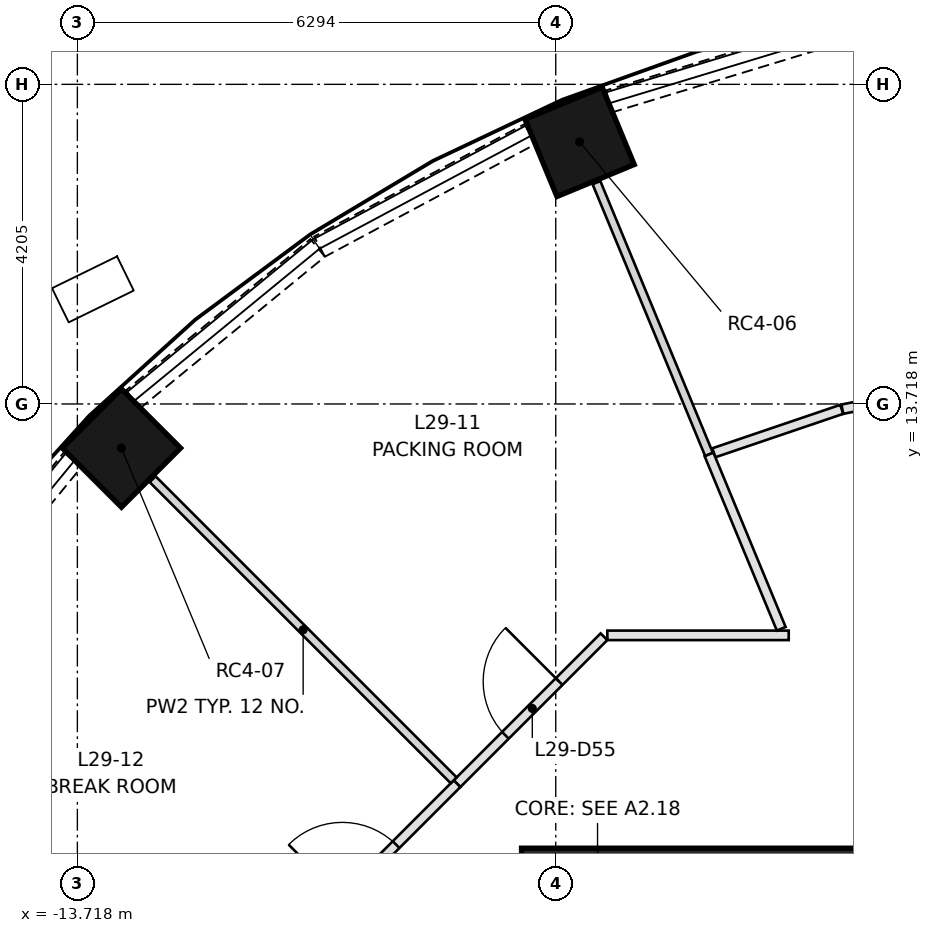
"""IFC4 building model, lengths in metres.
Left out: names, types, materials, properties, quantities, classifications, styles, units other than length and angle.
Written with IfcOpenShell. Run it as: python <this file> out.ifc"""

import sys

from ifc_helpers import new_model, si_unit, direction, frame, frame_2d, origin, origin_2d, place, context, subcontext, project, spatial, rectangle, extrude, element, fill, save


model = new_model("IFC4")
c1 = context("Model", 3, precision=1e-05, world=origin(), true_north=direction((0.0, 1.0)))
c2 = subcontext(c1, "Body", "Model", "MODEL_VIEW")
j1 = project(units=[si_unit("LENGTHUNIT", "METRE"), si_unit("PLANEANGLEUNIT", "RADIAN")], contexts=[c1])
p1 = place(None, origin())
s1 = spatial("IfcSite", under=j1, at=p1, CompositionType="ELEMENT")
p2 = place(p1, origin())
s2 = spatial("IfcBuilding", under=s1, at=p2, CompositionType="ELEMENT")
p3 = place(p2, frame((0.0, 0.0, 112.9)))
s3 = spatial("IfcBuildingStorey", under=s2, at=p3, CompositionType="ELEMENT", Elevation=112.9)
for number, where, z_axis, x_axis in (
    (1, (-7.11, 17.166, 0.0), (0.0, 0.0, 1.0), (-0.383, 0.924, 0.0)),
    (2, (-13.138, 13.138, 0.0), (0.0, 0.0, 1.0), (-0.707, 0.707, 0.0)),
):
    element("IfcColumn", number, at=place(p3, frame(where, z_axis=z_axis, x_axis=x_axis)), inside=s3, PredefinedType="COLUMN", context=c2, shape_type="SweptSolid", body=[
        extrude(rectangle(XDim=1.1, YDim=1.1, at=origin_2d()), origin(), (0.0, 0.0, 1.0), 3.65),
    ])
p4 = place(p3, frame((-7.874, 7.499, 0.0), z_axis=(0.0, 0.0, 1.0), x_axis=(1.0, 0.0, 0.0)))
e3 = element("IfcWall", 3, at=p4, inside=s3, PredefinedType="SHEAR", context=c2, shape_type="SweptSolid", body=[
    extrude(rectangle(XDim=15.748, YDim=0.75, at=frame_2d((7.874, 0.0))), origin(), (0.0, 0.0, 1.0), 3.65),
])
p5 = place(p3, frame((-3.717, 18.611, 0.0), z_axis=(0.0, 0.0, 1.0), x_axis=(-0.956961595403, -0.290214584271, 0.0)))
e4 = element("IfcWall", 4, at=p5, inside=s3, PredefinedType="SOLIDWALL", context=c2, shape_type="SweptSolid", body=[
    extrude(rectangle(XDim=3.139, YDim=0.3, at=frame_2d((1.57, 0.0))), origin(), (0.0, 0.0, 1.0), 0.9),
])
p6 = place(p3, frame((-7.763, 17.268, 0.0), z_axis=(0.0, 0.0, 1.0), x_axis=(-0.88193278355, -0.471375185282, 0.0)))
e5 = element("IfcWall", 5, at=p6, inside=s3, PredefinedType="SOLIDWALL", context=c2, shape_type="SweptSolid", body=[
    extrude(rectangle(XDim=3.139, YDim=0.3, at=frame_2d((1.57, 0.0))), origin(), (0.0, 0.0, 1.0), 0.9),
])
for number, where, z_axis, x_axis in (
    (6, (-10.557, 15.771, 0.0), (0.0, 0.0, 1.0), (-0.773, -0.634, 0.0)),
    (7, (-13.781, 12.983, 0.0), (0.0, 0.0, 1.0), (-0.634, -0.773, 0.0)),
):
    element("IfcWall", number, at=place(p3, frame(where, z_axis=z_axis, x_axis=x_axis)), inside=s3, PredefinedType="SOLIDWALL", context=c2, shape_type="SweptSolid", body=[
        extrude(rectangle(XDim=3.139, YDim=0.3, at=frame_2d((1.569, 0.0))), origin(), (0.0, 0.0, 1.0), 0.9),
    ])
p7 = place(p3, frame((-8.722, 8.722, 0.0), z_axis=(0.0, 0.0, 1.0), x_axis=(0.707062130741, 0.707151428813, 0.0)))
e8 = element("IfcWall", 8, at=p7, inside=s3, PredefinedType="PARTITIONING", context=c2, shape_type="SweptSolid", body=[
    extrude(rectangle(XDim=2.734, YDim=0.125, at=frame_2d((1.367, 0.0))), origin(), (0.0, 0.0, 1.0), 3.3),
])
p8 = place(p7, frame((0.9, 0.0, 0.0)))
e9 = element("IfcOpeningElement", 9, at=p8, cuts=e8, PredefinedType="OPENING", context=c2, shape_type="SweptSolid", body=[
    extrude(rectangle(XDim=1.0, YDim=2.1, at=frame_2d((0.5, 1.05))), frame((0.0, 0.073, 0.0), z_axis=(0.0, -1.0, 0.0), x_axis=(1.0, 0.0, 0.0)), (0.0, 0.0, 1.0), 0.145),
])
p9 = place(p3, frame((-6.745, 10.674, 0.0), z_axis=(0.0, 0.0, 1.0), x_axis=(1.0, 0.0, 0.0)))
e10 = element("IfcWall", 10, at=p9, inside=s3, PredefinedType="PARTITIONING", context=c2, shape_type="SweptSolid", body=[
    extrude(rectangle(XDim=2.386, YDim=0.125, at=frame_2d((1.193, 0.0))), origin(), (0.0, 0.0, 1.0), 3.3),
])
p10 = place(p3, frame((-10.656, 6.789, 0.0), z_axis=(0.0, 0.0, 1.0), x_axis=(0.707151428813, 0.707062130741, 0.0)))
e11 = element("IfcWall", 11, at=p10, inside=s3, PredefinedType="PARTITIONING", context=c2, shape_type="SweptSolid", body=[
    extrude(rectangle(XDim=2.734, YDim=0.125, at=frame_2d((1.367, 0.0))), origin(), (0.0, 0.0, 1.0), 3.3),
])
p11 = place(p10, frame((0.6, 0.0, 0.0)))
e12 = element("IfcOpeningElement", 12, at=p11, cuts=e11, PredefinedType="OPENING", context=c2, shape_type="SweptSolid", body=[
    extrude(rectangle(XDim=1.0, YDim=2.1, at=frame_2d((0.5, 1.05))), frame((0.0, 0.073, 0.0), z_axis=(0.0, -1.0, 0.0), x_axis=(1.0, 0.0, 0.0)), (0.0, 0.0, 1.0), 0.145),
])
p12 = place(p3, frame((-3.661, 13.647, 0.0), z_axis=(0.0, 0.0, 1.0), x_axis=(-0.946896580983, -0.321538279095, 0.0)))
e13 = element("IfcWall", 13, at=p12, inside=s3, PredefinedType="PARTITIONING", context=c2, shape_type="SweptSolid", body=[
    extrude(rectangle(XDim=1.778, YDim=0.125, at=frame_2d((0.889, 0.0))), origin(), (0.0, 0.0, 1.0), 3.3),
])
p13 = place(p3, frame((-1.848, 14.008, 0.0), z_axis=(0.0, 0.0, 1.0), x_axis=(-0.980794424524, -0.195044345786, 0.0)))
e14 = element("IfcWall", 14, at=p13, inside=s3, PredefinedType="PARTITIONING", context=c2, shape_type="SweptSolid", body=[
    extrude(rectangle(XDim=1.84, YDim=0.125, at=frame_2d((0.92, 0.0))), origin(), (0.0, 0.0, 1.0), 3.3),
])
p14 = place(p3, frame((-5.407, 13.054, 0.0), z_axis=(0.0, 0.0, 1.0), x_axis=(-0.382674944996, 0.923883048049, 0.0)))
e15 = element("IfcWall", 15, at=p14, inside=s3, PredefinedType="PARTITIONING", context=c2, shape_type="SweptSolid", body=[
    extrude(rectangle(XDim=3.87, YDim=0.11, at=frame_2d((1.935, 0.0))), origin(), (0.0, 0.0, 1.0), 3.3),
])
p15 = place(p3, frame((-4.457, 10.76, 0.0), z_axis=(0.0, 0.0, 1.0), x_axis=(-0.38268757567, 0.923877816288, 0.0)))
e16 = element("IfcWall", 16, at=p15, inside=s3, PredefinedType="PARTITIONING", context=c2, shape_type="SweptSolid", body=[
    extrude(rectangle(XDim=2.483, YDim=0.125, at=frame_2d((1.241, 0.0))), origin(), (0.0, 0.0, 1.0), 3.3),
])
p16 = place(p3, frame((-8.767, 8.767, 0.0), z_axis=(0.0, 0.0, 1.0), x_axis=(-0.707106781187, 0.707106781187, 0.0)))
e17 = element("IfcWall", 17, at=p16, inside=s3, PredefinedType="PARTITIONING", context=c2, shape_type="SweptSolid", body=[
    extrude(rectangle(XDim=5.602, YDim=0.11, at=frame_2d((2.801, 0.0))), origin(), (0.0, 0.0, 1.0), 3.3),
])
p17 = place(p8, origin())
e18 = element("IfcDoor", 18, at=p17, inside=s3, OperationType="SINGLE_SWING_RIGHT", PredefinedType="DOOR", context=c2, shape_type="SweptSolid", body=[
    extrude(rectangle(XDim=1.0, YDim=2.1, at=frame_2d((0.5, 1.05))), frame((0.0, 0.025, 0.0), z_axis=(0.0, -1.0, 0.0), x_axis=(1.0, 0.0, 0.0)), (0.0, 0.0, 1.0), 0.05),
])
fill(e9, e18)
p18 = place(p11, origin())
e19 = element("IfcDoor", 19, at=p18, inside=s3, OperationType="SINGLE_SWING_LEFT", PredefinedType="DOOR", context=c2, shape_type="SweptSolid", body=[
    extrude(rectangle(XDim=1.0, YDim=2.1, at=frame_2d((0.5, 1.05))), frame((0.0, 0.025, 0.0), z_axis=(0.0, -1.0, 0.0), x_axis=(1.0, 0.0, 0.0)), (0.0, 0.0, 1.0), 0.05),
])
fill(e12, e19)
save(model, sys.argv[1])
